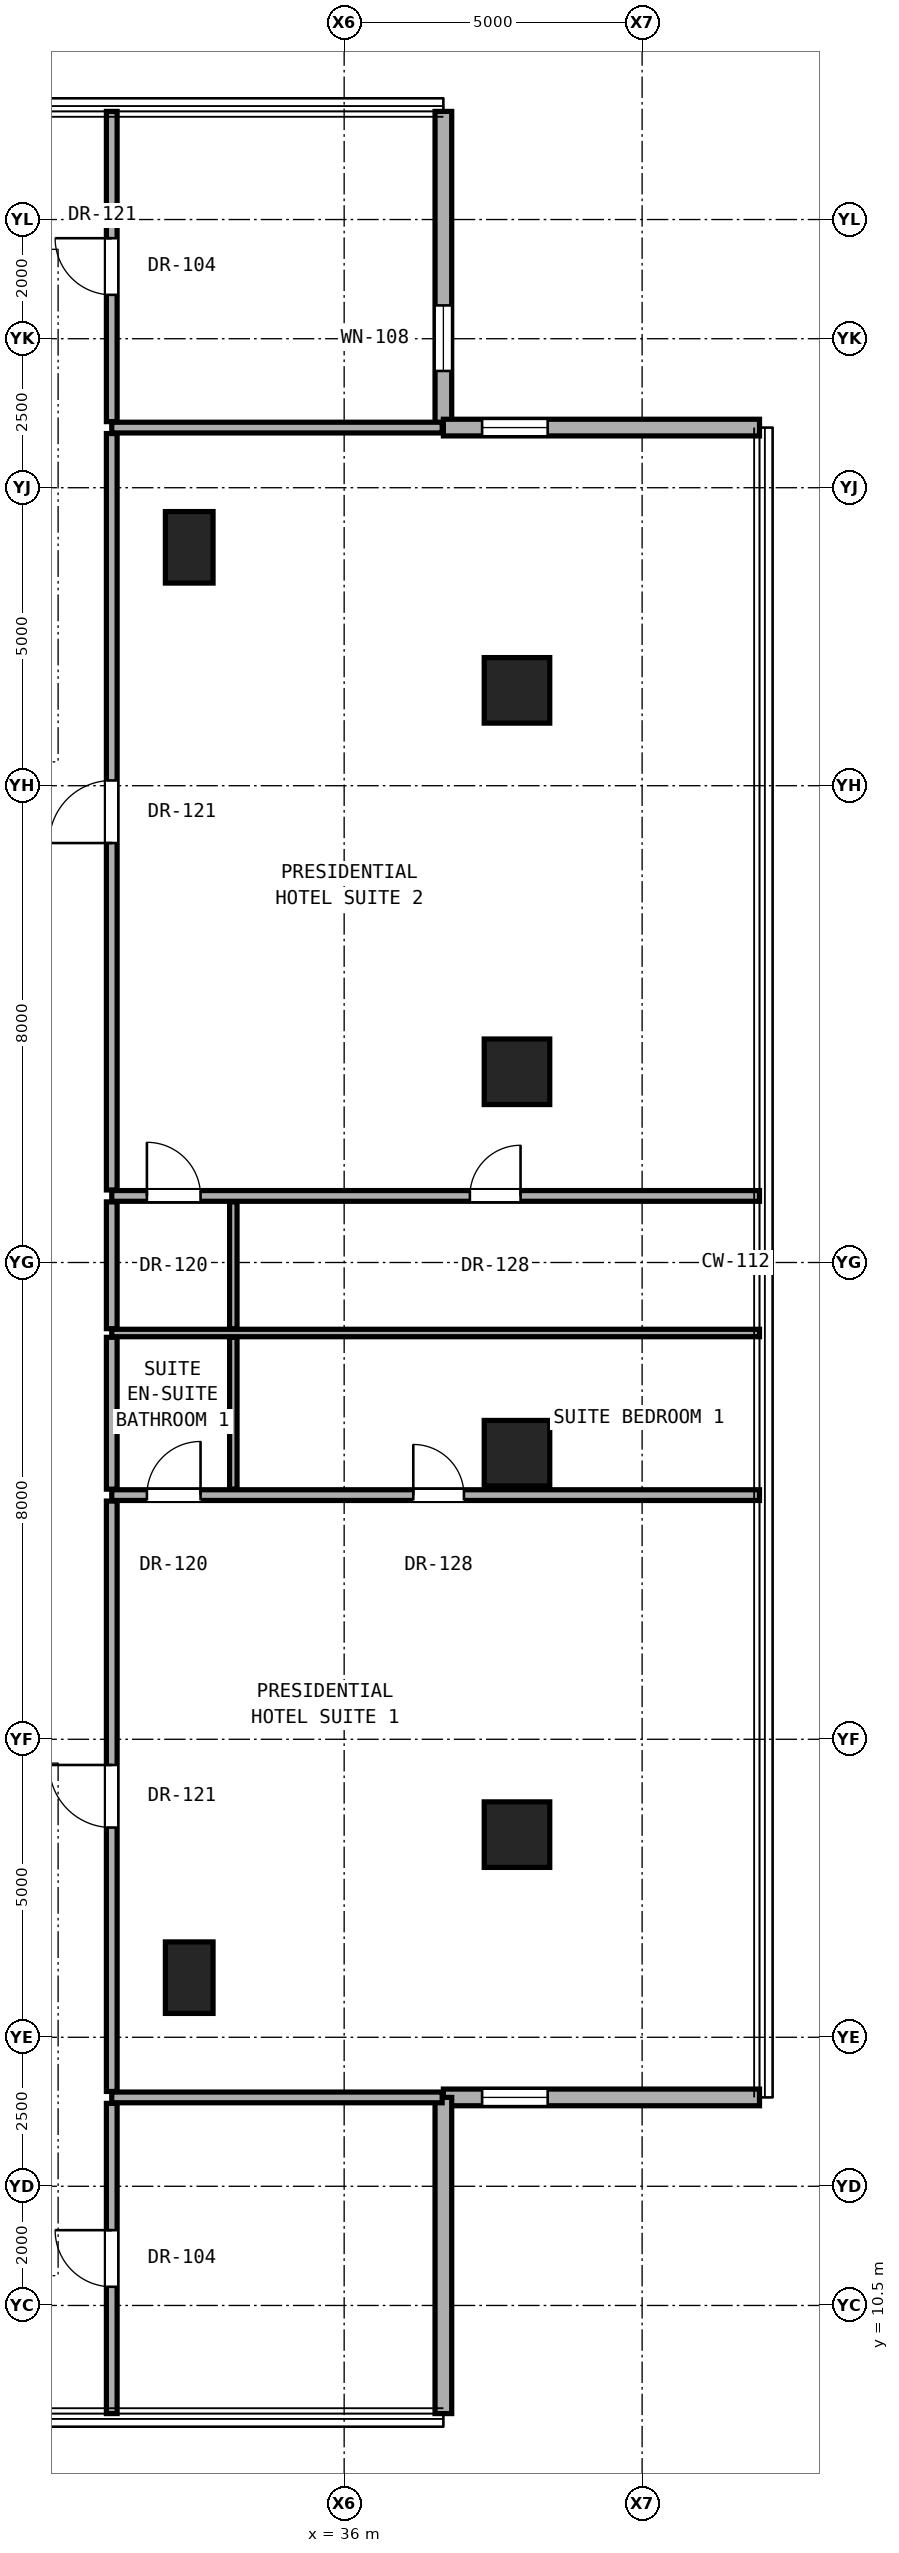
"""IFC4 building model, lengths in metres.
Left out: names, types, materials, properties, quantities, classifications, styles, units other than length and angle.
Written with IfcOpenShell. Run it as: python <this file> out.ifc"""

import sys

from ifc_helpers import new_model, si_unit, direction, frame, frame_2d, origin, origin_2d, place, context, subcontext, project, spatial, rectangle, hollow_rectangle, extrude, element, fill, save


model = new_model("IFC4")
c1 = context("Model", 3, precision=1e-05, world=origin(), true_north=direction((0.0, 1.0)))
c2 = subcontext(c1, "Body", "Model", "MODEL_VIEW")
j1 = project(units=[si_unit("LENGTHUNIT", "METRE"), si_unit("PLANEANGLEUNIT", "RADIAN")], contexts=[c1])
p1 = place(None, origin())
s1 = spatial("IfcSite", under=j1, at=p1, CompositionType="ELEMENT")
p2 = place(p1, origin())
s2 = spatial("IfcBuilding", under=s1, at=p2, CompositionType="ELEMENT")
p3 = place(p2, frame((0.0, 0.0, 114.8)))
s3 = spatial("IfcBuildingStorey", under=s2, at=p3, CompositionType="ELEMENT", Elevation=114.8)
for number, where, z_axis, x_axis in (
    (1, (38.9, 18.4, 0.0), (0.0, 0.0, 1.0), (1.0, 0.0, 0.0)),
    (2, (38.9, 24.8, 0.0), (0.0, 0.0, 1.0), (1.0, 0.0, 0.0)),
    (3, (38.9, 31.2, 0.0), (0.0, 0.0, 1.0), (1.0, 0.0, 0.0)),
    (4, (38.9, 37.6, 0.0), (0.0, 0.0, 1.0), (1.0, 0.0, 0.0)),
):
    element("IfcColumn", number, at=place(p3, frame(where, z_axis=z_axis, x_axis=x_axis)), inside=s3, PredefinedType="COLUMN", context=c2, shape_type="SweptSolid", body=[
        extrude(hollow_rectangle(XDim=1.1, YDim=1.1, WallThickness=0.06, at=origin_2d()), origin(), (0.0, 0.0, 1.0), 3.3),
    ])
for number, where, z_axis, x_axis in (
    (5, (33.4, 16.0, 0.0), (0.0, 0.0, 1.0), (1.0, 0.0, 0.0)),
    (6, (33.4, 40.0, 0.0), (0.0, 0.0, 1.0), (1.0, 0.0, 0.0)),
):
    element("IfcColumn", number, at=place(p3, frame(where, z_axis=z_axis, x_axis=x_axis)), inside=s3, PredefinedType="PILASTER", context=c2, shape_type="SweptSolid", body=[
        extrude(rectangle(XDim=0.8, YDim=1.2, at=origin_2d()), origin(), (0.0, 0.0, 1.0), 3.3),
    ])
p4 = place(p3, frame((37.665, 42.009, 0.0), z_axis=(0.0, 0.0, 1.0), x_axis=(0.0, 1.0, 0.0)))
e7 = element("IfcWall", 7, at=p4, inside=s3, PredefinedType="SOLIDWALL", context=c2, shape_type="SweptSolid", body=[
    extrude(rectangle(XDim=5.305, YDim=0.28, at=frame_2d((2.652, 0.0))), origin(), (0.0, 0.0, 1.0), 3.06),
])
p5 = place(p4, frame((0.95, 0.0, 0.85)))
e8 = element("IfcOpeningElement", 8, at=p5, cuts=e7, PredefinedType="OPENING", context=c2, shape_type="SweptSolid", body=[
    extrude(rectangle(XDim=1.1, YDim=2.0, at=frame_2d((0.55, 1.0))), frame((0.0, 0.15, 0.0), z_axis=(0.0, -1.0, 0.0), x_axis=(1.0, 0.0, 0.0)), (0.0, 0.0, 1.0), 0.3),
])
p6 = place(p3, frame((37.665, 13.991, 0.0), z_axis=(0.0, 0.0, 1.0), x_axis=(1.0, 0.0, 0.0)))
e9 = element("IfcWall", 9, at=p6, inside=s3, PredefinedType="SOLIDWALL", context=c2, shape_type="SweptSolid", body=[
    extrude(rectangle(XDim=5.305, YDim=0.28, at=frame_2d((2.652, 0.0))), origin(), (0.0, 0.0, 1.0), 3.06),
])
p7 = place(p6, frame((0.65, 0.0, 0.85)))
e10 = element("IfcOpeningElement", 10, at=p7, cuts=e9, PredefinedType="OPENING", context=c2, shape_type="SweptSolid", body=[
    extrude(rectangle(XDim=1.1, YDim=2.0, at=frame_2d((0.55, 1.0))), frame((0.0, 0.15, 0.0), z_axis=(0.0, -1.0, 0.0), x_axis=(1.0, 0.0, 0.0)), (0.0, 0.0, 1.0), 0.3),
])
p8 = place(p3, frame((37.665, 8.686, 0.0), z_axis=(0.0, 0.0, 1.0), x_axis=(0.0, 1.0, 0.0)))
e11 = element("IfcWall", 11, at=p8, inside=s3, PredefinedType="SOLIDWALL", context=c2, shape_type="SweptSolid", body=[
    extrude(rectangle(XDim=5.305, YDim=0.28, at=frame_2d((2.652, 0.0))), origin(), (0.0, 0.0, 1.0), 3.06),
])
p9 = place(p3, frame((42.97, 42.009, 0.0), z_axis=(0.0, 0.0, 1.0), x_axis=(-1.0, 0.0, 0.0)))
e12 = element("IfcWall", 12, at=p9, inside=s3, PredefinedType="SOLIDWALL", context=c2, shape_type="SweptSolid", body=[
    extrude(rectangle(XDim=5.305, YDim=0.28, at=frame_2d((2.652, 0.0))), origin(), (0.0, 0.0, 1.0), 3.06),
])
p10 = place(p9, frame((3.555, 0.0, 0.85)))
e13 = element("IfcOpeningElement", 13, at=p10, cuts=e12, PredefinedType="OPENING", context=c2, shape_type="SweptSolid", body=[
    extrude(rectangle(XDim=1.1, YDim=2.0, at=frame_2d((0.55, 1.0))), frame((0.0, 0.15, 0.0), z_axis=(0.0, -1.0, 0.0), x_axis=(1.0, 0.0, 0.0)), (0.0, 0.0, 1.0), 0.3),
])
p11 = place(p3, frame((32.1, 13.991, 0.0), z_axis=(0.0, 0.0, 1.0), x_axis=(1.0, 0.0, 0.0)))
e14 = element("IfcWall", 14, at=p11, inside=s3, PredefinedType="PARTITIONING", context=c2, shape_type="SweptSolid", body=[
    extrude(rectangle(XDim=5.545, YDim=0.18, at=frame_2d((2.772, 0.0))), origin(), (0.0, 0.0, 1.0), 3.08),
])
p12 = place(p3, frame((32.1, 24.097, 0.0), z_axis=(0.0, 0.0, 1.0), x_axis=(1.0, 0.0, 0.0)))
e15 = element("IfcWall", 15, at=p12, inside=s3, PredefinedType="PARTITIONING", context=c2, shape_type="SweptSolid", body=[
    extrude(rectangle(XDim=10.87, YDim=0.18, at=frame_2d((5.435, 0.0))), origin(), (0.0, 0.0, 1.0), 2.145),
])
p13 = place(p12, frame((5.06, 0.0, 0.0)))
e16 = element("IfcOpeningElement", 16, at=p13, cuts=e15, PredefinedType="OPENING", context=c2, shape_type="SweptSolid", body=[
    extrude(rectangle(XDim=0.85, YDim=2.01, at=frame_2d((0.425, 1.005))), frame((0.0, 0.1, 0.0), z_axis=(0.0, -1.0, 0.0), x_axis=(1.0, 0.0, 0.0)), (0.0, 0.0, 1.0), 0.2),
])
p14 = place(p12, frame((0.59, 0.0, 0.0)))
e17 = element("IfcOpeningElement", 17, at=p14, cuts=e15, PredefinedType="OPENING", context=c2, shape_type="SweptSolid", body=[
    extrude(rectangle(XDim=0.9, YDim=2.1, at=frame_2d((0.45, 1.05))), frame((0.0, 0.1, 0.0), z_axis=(0.0, -1.0, 0.0), x_axis=(1.0, 0.0, 0.0)), (0.0, 0.0, 1.0), 0.2),
])
p15 = place(p3, frame((32.1, 26.817, 0.0), z_axis=(0.0, 0.0, 1.0), x_axis=(1.0, 0.0, 0.0)))
e18 = element("IfcWall", 18, at=p15, inside=s3, PredefinedType="PARTITIONING", context=c2, shape_type="SweptSolid", body=[
    extrude(rectangle(XDim=10.87, YDim=0.125, at=frame_2d((5.435, 0.0))), origin(), (0.0, 0.0, 1.0), 2.145),
])
p16 = place(p3, frame((32.1, 29.117, 0.0), z_axis=(0.0, 0.0, 1.0), x_axis=(1.0, 0.0, 0.0)))
e19 = element("IfcWall", 19, at=p16, inside=s3, PredefinedType="PARTITIONING", context=c2, shape_type="SweptSolid", body=[
    extrude(rectangle(XDim=10.87, YDim=0.18, at=frame_2d((5.435, 0.0))), origin(), (0.0, 0.0, 1.0), 2.145),
])
p17 = place(p16, frame((6.01, 0.0, 0.0)))
e20 = element("IfcOpeningElement", 20, at=p17, cuts=e19, PredefinedType="OPENING", context=c2, shape_type="SweptSolid", body=[
    extrude(rectangle(XDim=0.85, YDim=2.01, at=frame_2d((0.425, 1.005))), frame((0.0, 0.1, 0.0), z_axis=(0.0, -1.0, 0.0), x_axis=(1.0, 0.0, 0.0)), (0.0, 0.0, 1.0), 0.2),
])
p18 = place(p16, frame((0.59, 0.0, 0.0)))
e21 = element("IfcOpeningElement", 21, at=p18, cuts=e19, PredefinedType="OPENING", context=c2, shape_type="SweptSolid", body=[
    extrude(rectangle(XDim=0.9, YDim=2.1, at=frame_2d((0.45, 1.05))), frame((0.0, 0.1, 0.0), z_axis=(0.0, -1.0, 0.0), x_axis=(1.0, 0.0, 0.0)), (0.0, 0.0, 1.0), 0.2),
])
p19 = place(p3, frame((32.1, 42.009, 0.0), z_axis=(0.0, 0.0, 1.0), x_axis=(1.0, 0.0, 0.0)))
e22 = element("IfcWall", 22, at=p19, inside=s3, PredefinedType="PARTITIONING", context=c2, shape_type="SweptSolid", body=[
    extrude(rectangle(XDim=5.545, YDim=0.18, at=frame_2d((2.772, 0.0))), origin(), (0.0, 0.0, 1.0), 3.08),
])
p20 = place(p3, frame((32.1, 8.686, 0.0), z_axis=(0.0, 0.0, 1.0), x_axis=(0.0, 1.0, 0.0)))
e23 = element("IfcWall", 23, at=p20, inside=s3, PredefinedType="PARTITIONING", context=c2, shape_type="SweptSolid", body=[
    extrude(rectangle(XDim=5.205, YDim=0.18, at=frame_2d((2.603, 0.0))), origin(), (0.0, 0.0, 1.0), 3.08),
])
p21 = place(p20, frame((2.127, 0.0, 0.0)))
e24 = element("IfcOpeningElement", 24, at=p21, cuts=e23, PredefinedType="OPENING", context=c2, shape_type="SweptSolid", body=[
    extrude(rectangle(XDim=0.95, YDim=2.15, at=frame_2d((0.475, 1.075))), frame((0.0, 0.1, 0.0), z_axis=(0.0, -1.0, 0.0), x_axis=(1.0, 0.0, 0.0)), (0.0, 0.0, 1.0), 0.2),
])
p22 = place(p3, frame((32.1, 14.091, 0.0), z_axis=(0.0, 0.0, 1.0), x_axis=(0.0, 1.0, 0.0)))
e25 = element("IfcWall", 25, at=p22, inside=s3, PredefinedType="PARTITIONING", context=c2, shape_type="SweptSolid", body=[
    extrude(rectangle(XDim=9.906, YDim=0.18, at=frame_2d((4.953, 0.0))), origin(), (0.0, 0.0, 1.0), 2.456),
])
p23 = place(p22, frame((4.428, 0.0, 0.0)))
e26 = element("IfcOpeningElement", 26, at=p23, cuts=e25, PredefinedType="OPENING", context=c2, shape_type="SweptSolid", body=[
    extrude(rectangle(XDim=1.05, YDim=2.2, at=frame_2d((0.525, 1.1))), frame((0.0, 0.1, 0.0), z_axis=(0.0, -1.0, 0.0), x_axis=(1.0, 0.0, 0.0)), (0.0, 0.0, 1.0), 0.2),
])
p24 = place(p3, frame((32.1, 24.197, 0.0), z_axis=(0.0, 0.0, 1.0), x_axis=(0.0, 1.0, 0.0)))
e27 = element("IfcWall", 27, at=p24, inside=s3, PredefinedType="PARTITIONING", context=c2, shape_type="SweptSolid", body=[
    extrude(rectangle(XDim=2.547, YDim=0.18, at=frame_2d((1.274, 0.0))), origin(), (0.0, 0.0, 1.0), 2.299),
])
p25 = place(p3, frame((32.1, 26.889, 0.0), z_axis=(0.0, 0.0, 1.0), x_axis=(0.0, 1.0, 0.0)))
e28 = element("IfcWall", 28, at=p25, inside=s3, PredefinedType="PARTITIONING", context=c2, shape_type="SweptSolid", body=[
    extrude(rectangle(XDim=2.128, YDim=0.18, at=frame_2d((1.064, 0.0))), origin(), (0.0, 0.0, 1.0), 3.08),
])
p26 = place(p3, frame((32.1, 29.217, 0.0), z_axis=(0.0, 0.0, 1.0), x_axis=(0.0, 1.0, 0.0)))
e29 = element("IfcWall", 29, at=p26, inside=s3, PredefinedType="PARTITIONING", context=c2, shape_type="SweptSolid", body=[
    extrude(rectangle(XDim=12.692, YDim=0.18, at=frame_2d((6.346, 0.0))), origin(), (0.0, 0.0, 1.0), 2.299),
])
p27 = place(p26, frame((5.821, 0.0, 0.0)))
e30 = element("IfcOpeningElement", 30, at=p27, cuts=e29, PredefinedType="OPENING", context=c2, shape_type="SweptSolid", body=[
    extrude(rectangle(XDim=1.05, YDim=2.2, at=frame_2d((0.525, 1.1))), frame((0.0, 0.1, 0.0), z_axis=(0.0, -1.0, 0.0), x_axis=(1.0, 0.0, 0.0)), (0.0, 0.0, 1.0), 0.2),
])
p28 = place(p3, frame((32.1, 42.109, 0.0), z_axis=(0.0, 0.0, 1.0), x_axis=(0.0, 1.0, 0.0)))
e31 = element("IfcWall", 31, at=p28, inside=s3, PredefinedType="PARTITIONING", context=c2, shape_type="SweptSolid", body=[
    extrude(rectangle(XDim=5.205, YDim=0.18, at=frame_2d((2.603, 0.0))), origin(), (0.0, 0.0, 1.0), 3.08),
])
p29 = place(p28, frame((2.127, 0.0, 0.0)))
e32 = element("IfcOpeningElement", 32, at=p29, cuts=e31, PredefinedType="OPENING", context=c2, shape_type="SweptSolid", body=[
    extrude(rectangle(XDim=0.95, YDim=2.15, at=frame_2d((0.475, 1.075))), frame((0.0, 0.1, 0.0), z_axis=(0.0, -1.0, 0.0), x_axis=(1.0, 0.0, 0.0)), (0.0, 0.0, 1.0), 0.2),
])
p30 = place(p3, frame((34.14, 24.197, 0.0), z_axis=(0.0, 0.0, 1.0), x_axis=(0.0, 1.0, 0.0)))
e33 = element("IfcWall", 33, at=p30, inside=s3, PredefinedType="PARTITIONING", context=c2, shape_type="SweptSolid", body=[
    extrude(rectangle(XDim=2.547, YDim=0.125, at=frame_2d((1.274, 0.0))), origin(), (0.0, 0.0, 1.0), 2.299),
])
p31 = place(p3, frame((34.14, 26.889, 0.0), z_axis=(0.0, 0.0, 1.0), x_axis=(0.0, 1.0, 0.0)))
e34 = element("IfcWall", 34, at=p31, inside=s3, PredefinedType="PARTITIONING", context=c2, shape_type="SweptSolid", body=[
    extrude(rectangle(XDim=2.128, YDim=0.125, at=frame_2d((1.064, 0.0))), origin(), (0.0, 0.0, 1.0), 3.08),
])
p32 = place(p5, origin())
e35 = element("IfcWindow", 35, at=p32, inside=s3, PartitioningType="SINGLE_PANEL", PredefinedType="WINDOW", context=c2, shape_type="SweptSolid", body=[
    extrude(rectangle(XDim=1.1, YDim=2.0, at=frame_2d((0.55, 1.0))), frame((0.0, 0.03, 0.0), z_axis=(0.0, -1.0, 0.0), x_axis=(1.0, 0.0, 0.0)), (0.0, 0.0, 1.0), 0.06),
])
fill(e8, e35)
p33 = place(p7, origin())
e36 = element("IfcWindow", 36, at=p33, inside=s3, PartitioningType="SINGLE_PANEL", PredefinedType="WINDOW", context=c2, shape_type="SweptSolid", body=[
    extrude(rectangle(XDim=1.1, YDim=2.0, at=frame_2d((0.55, 1.0))), frame((0.0, 0.03, 0.0), z_axis=(0.0, -1.0, 0.0), x_axis=(1.0, 0.0, 0.0)), (0.0, 0.0, 1.0), 0.06),
])
fill(e10, e36)
p34 = place(p10, origin())
e37 = element("IfcWindow", 37, at=p34, inside=s3, PartitioningType="SINGLE_PANEL", PredefinedType="WINDOW", context=c2, shape_type="SweptSolid", body=[
    extrude(rectangle(XDim=1.1, YDim=2.0, at=frame_2d((0.55, 1.0))), frame((0.0, 0.03, 0.0), z_axis=(0.0, -1.0, 0.0), x_axis=(1.0, 0.0, 0.0)), (0.0, 0.0, 1.0), 0.06),
])
fill(e13, e37)
p35 = place(p23, origin())
e38 = element("IfcDoor", 38, at=p35, inside=s3, OperationType="SINGLE_SWING_RIGHT", PredefinedType="DOOR", context=c2, shape_type="SweptSolid", body=[
    extrude(rectangle(XDim=1.05, YDim=2.2, at=frame_2d((0.525, 1.1))), frame((0.0, 0.025, 0.0), z_axis=(0.0, -1.0, 0.0), x_axis=(1.0, 0.0, 0.0)), (0.0, 0.0, 1.0), 0.05),
])
fill(e26, e38)
p36 = place(p13, origin())
e39 = element("IfcDoor", 39, at=p36, inside=s3, OperationType="SINGLE_SWING_LEFT", PredefinedType="DOOR", context=c2, shape_type="SweptSolid", body=[
    extrude(rectangle(XDim=0.85, YDim=2.01, at=frame_2d((0.425, 1.005))), frame((0.0, 0.025, 0.0), z_axis=(0.0, -1.0, 0.0), x_axis=(1.0, 0.0, 0.0)), (0.0, 0.0, 1.0), 0.05),
])
fill(e16, e39)
p37 = place(p14, origin())
e40 = element("IfcDoor", 40, at=p37, inside=s3, OperationType="SINGLE_SWING_RIGHT", PredefinedType="DOOR", context=c2, shape_type="SweptSolid", body=[
    extrude(rectangle(XDim=0.9, YDim=2.1, at=frame_2d((0.45, 1.05))), frame((0.0, 0.025, 0.0), z_axis=(0.0, -1.0, 0.0), x_axis=(1.0, 0.0, 0.0)), (0.0, 0.0, 1.0), 0.05),
])
fill(e17, e40)
p38 = place(p27, origin())
e41 = element("IfcDoor", 41, at=p38, inside=s3, OperationType="SINGLE_SWING_LEFT", PredefinedType="DOOR", context=c2, shape_type="SweptSolid", body=[
    extrude(rectangle(XDim=1.05, YDim=2.2, at=frame_2d((0.525, 1.1))), frame((0.0, 0.025, 0.0), z_axis=(0.0, -1.0, 0.0), x_axis=(1.0, 0.0, 0.0)), (0.0, 0.0, 1.0), 0.05),
])
fill(e30, e41)
p39 = place(p17, origin())
e42 = element("IfcDoor", 42, at=p39, inside=s3, OperationType="SINGLE_SWING_RIGHT", PredefinedType="DOOR", context=c2, shape_type="SweptSolid", body=[
    extrude(rectangle(XDim=0.85, YDim=2.01, at=frame_2d((0.425, 1.005))), frame((0.0, 0.025, 0.0), z_axis=(0.0, -1.0, 0.0), x_axis=(1.0, 0.0, 0.0)), (0.0, 0.0, 1.0), 0.05),
])
fill(e20, e42)
p40 = place(p18, origin())
e43 = element("IfcDoor", 43, at=p40, inside=s3, OperationType="SINGLE_SWING_LEFT", PredefinedType="DOOR", context=c2, shape_type="SweptSolid", body=[
    extrude(rectangle(XDim=0.9, YDim=2.1, at=frame_2d((0.45, 1.05))), frame((0.0, 0.025, 0.0), z_axis=(0.0, -1.0, 0.0), x_axis=(1.0, 0.0, 0.0)), (0.0, 0.0, 1.0), 0.05),
])
fill(e21, e43)
p41 = place(p21, origin())
e44 = element("IfcDoor", 44, at=p41, inside=s3, OperationType="SINGLE_SWING_RIGHT", PredefinedType="DOOR", context=c2, shape_type="SweptSolid", body=[
    extrude(rectangle(XDim=0.95, YDim=2.15, at=frame_2d((0.475, 1.075))), frame((0.0, 0.025, 0.0), z_axis=(0.0, -1.0, 0.0), x_axis=(1.0, 0.0, 0.0)), (0.0, 0.0, 1.0), 0.05),
])
fill(e24, e44)
p42 = place(p29, origin())
e45 = element("IfcDoor", 45, at=p42, inside=s3, OperationType="SINGLE_SWING_RIGHT", PredefinedType="DOOR", context=c2, shape_type="SweptSolid", body=[
    extrude(rectangle(XDim=0.95, YDim=2.15, at=frame_2d((0.475, 1.075))), frame((0.0, 0.025, 0.0), z_axis=(0.0, -1.0, 0.0), x_axis=(1.0, 0.0, 0.0)), (0.0, 0.0, 1.0), 0.05),
])
fill(e32, e45)
save(model, sys.argv[1])
